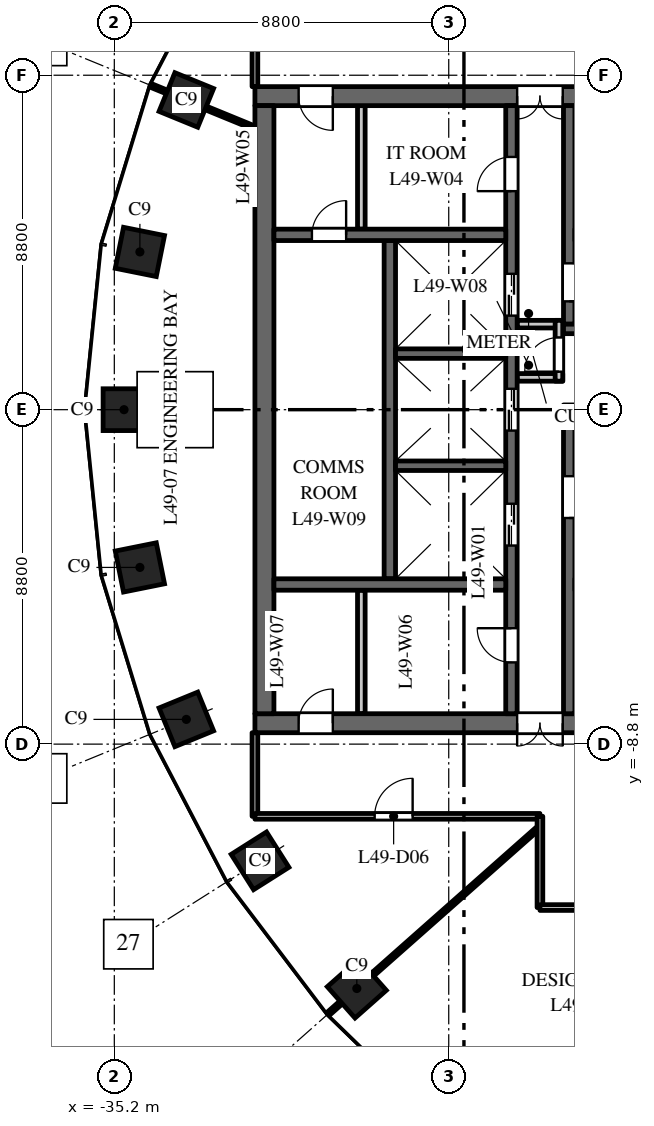
"""IFC4 building model, lengths in metres.
Left out: names, types, materials, properties, quantities, classifications, styles, units other than length and angle.
Written with IfcOpenShell. Run it as: python <this file> out.ifc"""

import sys

from ifc_helpers import new_model, si_unit, direction, frame, frame_2d, origin, origin_2d, place, context, subcontext, project, spatial, rectangle, extrude, element, fill, save


model = new_model("IFC4")
c1 = context("Model", 3, precision=1e-05, world=origin(), true_north=direction((0.0, 1.0)))
c2 = subcontext(c1, "Body", "Model", "MODEL_VIEW")
j1 = project(units=[si_unit("LENGTHUNIT", "METRE"), si_unit("PLANEANGLEUNIT", "RADIAN")], contexts=[c1])
p1 = place(None, origin())
s1 = spatial("IfcSite", under=j1, at=p1, CompositionType="ELEMENT")
p2 = place(p1, origin())
s2 = spatial("IfcBuilding", under=s1, at=p2, CompositionType="ELEMENT")
p3 = place(p2, frame((0.0, 0.0, 237.5)))
s3 = spatial("IfcBuildingStorey", under=s2, at=p3, CompositionType="ELEMENT", Elevation=237.5)
for number, where, z_axis, x_axis in (
    (1, (-33.305, 8.149, 0.0), (0.0, 0.0, 1.0), (-0.379, -0.925, 0.0)),
    (2, (-34.527, 4.151, 0.0), (0.0, 0.0, 1.0), (-0.197, -0.98, 0.0)),
    (3, (-34.945, 0.0, 0.0), (0.0, 0.0, 1.0), (0.0, -1.0, 0.0)),
    (4, (-34.527, -4.151, 0.0), (0.0, 0.0, 1.0), (0.197, -0.98, 0.0)),
    (5, (-33.305, -8.149, 0.0), (0.0, 0.0, 1.0), (0.379, -0.925, 0.0)),
    (6, (-31.365, -11.871, 0.0), (0.0, 0.0, 1.0), (0.535, -0.845, 0.0)),
    (7, (-28.819, -15.23, 0.0), (0.0, 0.0, 1.0), (0.663, -0.749, 0.0)),
):
    element("IfcColumn", number, at=place(p3, frame(where, z_axis=z_axis, x_axis=x_axis)), inside=s3, PredefinedType="COLUMN", context=c2, shape_type="SweptSolid", body=[
        extrude(rectangle(XDim=1.1, YDim=1.1, at=origin_2d()), origin(), (0.0, 0.0, 1.0), 4.0),
    ])
p4 = place(p3, frame((-16.5, 8.25, 0.0), z_axis=(0.0, 0.0, 1.0), x_axis=(-1.0, 0.0, 0.0)))
e8 = element("IfcWall", 8, at=p4, inside=s3, PredefinedType="SHEAR", context=c2, shape_type="SweptSolid", body=[
    extrude(rectangle(XDim=15.0, YDim=0.5, at=frame_2d((7.5, 0.0))), origin(), (0.0, 0.0, 1.0), 3.7),
])
p5 = place(p4, frame((6.9, 0.0, 0.0)))
e9 = element("IfcOpeningElement", 9, at=p5, cuts=e8, PredefinedType="OPENING", context=c2, shape_type="SweptSolid", body=[
    extrude(rectangle(XDim=1.2, YDim=2.1, at=frame_2d((0.6, 1.05))), frame((0.0, 0.26, 0.0), z_axis=(0.0, -1.0, 0.0), x_axis=(1.0, 0.0, 0.0)), (0.0, 0.0, 1.0), 0.52),
])
p6 = place(p4, frame((12.95, 0.0, 0.0)))
e10 = element("IfcOpeningElement", 10, at=p6, cuts=e8, PredefinedType="OPENING", context=c2, shape_type="SweptSolid", body=[
    extrude(rectangle(XDim=0.9, YDim=2.1, at=frame_2d((0.45, 1.05))), frame((0.0, 0.26, 0.0), z_axis=(0.0, -1.0, 0.0), x_axis=(1.0, 0.0, 0.0)), (0.0, 0.0, 1.0), 0.52),
])
p7 = place(p3, frame((-16.5, -8.25, 0.0), z_axis=(0.0, 0.0, 1.0), x_axis=(-1.0, 0.0, 0.0)))
e11 = element("IfcWall", 11, at=p7, inside=s3, PredefinedType="SHEAR", context=c2, shape_type="SweptSolid", body=[
    extrude(rectangle(XDim=15.0, YDim=0.5, at=frame_2d((7.5, 0.0))), origin(), (0.0, 0.0, 1.0), 3.7),
])
p8 = place(p7, frame((6.9, 0.0, 0.0)))
e12 = element("IfcOpeningElement", 12, at=p8, cuts=e11, PredefinedType="OPENING", context=c2, shape_type="SweptSolid", body=[
    extrude(rectangle(XDim=1.2, YDim=2.1, at=frame_2d((0.6, 1.05))), frame((0.0, 0.26, 0.0), z_axis=(0.0, -1.0, 0.0), x_axis=(1.0, 0.0, 0.0)), (0.0, 0.0, 1.0), 0.52),
])
p9 = place(p7, frame((12.95, 0.0, 0.0)))
e13 = element("IfcOpeningElement", 13, at=p9, cuts=e11, PredefinedType="OPENING", context=c2, shape_type="SweptSolid", body=[
    extrude(rectangle(XDim=0.9, YDim=2.1, at=frame_2d((0.45, 1.05))), frame((0.0, 0.26, 0.0), z_axis=(0.0, -1.0, 0.0), x_axis=(1.0, 0.0, 0.0)), (0.0, 0.0, 1.0), 0.52),
])
p10 = place(p3, frame((-27.95, -4.45, 0.0), z_axis=(0.0, 0.0, 1.0), x_axis=(0.0, 1.0, 0.0)))
e14 = element("IfcWall", 14, at=p10, inside=s3, PredefinedType="SHEAR", context=c2, shape_type="SweptSolid", body=[
    extrude(rectangle(XDim=8.9, YDim=0.3, at=frame_2d((4.45, 0.0))), origin(), (0.0, 0.0, 1.0), 3.7),
])
p11 = place(p3, frame((-24.75, -8.0, 0.0), z_axis=(0.0, 0.0, 1.0), x_axis=(0.0, 1.0, 0.0)))
e15 = element("IfcWall", 15, at=p11, inside=s3, PredefinedType="SHEAR", context=c2, shape_type="SweptSolid", body=[
    extrude(rectangle(XDim=16.0, YDim=0.3, at=frame_2d((8.0, 0.0))), origin(), (0.0, 0.0, 1.0), 3.7),
])
p12 = place(p11, frame((4.425, 0.0, 0.0)))
e16 = element("IfcOpeningElement", 16, at=p12, cuts=e15, PredefinedType="OPENING", context=c2, shape_type="SweptSolid", body=[
    extrude(rectangle(XDim=1.1, YDim=2.1, at=frame_2d((0.55, 1.05))), frame((0.0, 0.16, 0.0), z_axis=(0.0, -1.0, 0.0), x_axis=(1.0, 0.0, 0.0)), (0.0, 0.0, 1.0), 0.32),
])
p13 = place(p11, frame((7.45, 0.0, 0.0)))
e17 = element("IfcOpeningElement", 17, at=p13, cuts=e15, PredefinedType="OPENING", context=c2, shape_type="SweptSolid", body=[
    extrude(rectangle(XDim=1.1, YDim=2.1, at=frame_2d((0.55, 1.05))), frame((0.0, 0.16, 0.0), z_axis=(0.0, -1.0, 0.0), x_axis=(1.0, 0.0, 0.0)), (0.0, 0.0, 1.0), 0.32),
])
p14 = place(p11, frame((10.475, 0.0, 0.0)))
e18 = element("IfcOpeningElement", 18, at=p14, cuts=e15, PredefinedType="OPENING", context=c2, shape_type="SweptSolid", body=[
    extrude(rectangle(XDim=1.1, YDim=2.1, at=frame_2d((0.55, 1.05))), frame((0.0, 0.16, 0.0), z_axis=(0.0, -1.0, 0.0), x_axis=(1.0, 0.0, 0.0)), (0.0, 0.0, 1.0), 0.32),
])
p15 = place(p11, frame((13.75, 0.0, 0.0)))
e19 = element("IfcOpeningElement", 19, at=p15, cuts=e15, PredefinedType="OPENING", context=c2, shape_type="SweptSolid", body=[
    extrude(rectangle(XDim=0.9, YDim=2.1, at=frame_2d((0.45, 1.05))), frame((0.0, 0.16, 0.0), z_axis=(0.0, -1.0, 0.0), x_axis=(1.0, 0.0, 0.0)), (0.0, 0.0, 1.0), 0.32),
])
p16 = place(p11, frame((1.35, 0.0, 0.0)))
e20 = element("IfcOpeningElement", 20, at=p16, cuts=e15, PredefinedType="OPENING", context=c2, shape_type="SweptSolid", body=[
    extrude(rectangle(XDim=0.9, YDim=2.1, at=frame_2d((0.45, 1.05))), frame((0.0, 0.16, 0.0), z_axis=(0.0, -1.0, 0.0), x_axis=(1.0, 0.0, 0.0)), (0.0, 0.0, 1.0), 0.32),
])
p17 = place(p3, frame((-20.1, 0.0, 0.0), z_axis=(0.0, 0.0, 1.0), x_axis=(-1.0, 0.0, 0.0)))
e21 = element("IfcWall", 21, at=p17, inside=s3, PredefinedType="SHEAR", context=c2, shape_type="SweptSolid", body=[
    extrude(rectangle(XDim=3.28, YDim=0.25, at=frame_2d((1.64, 0.0))), origin(), (0.0, 0.0, 1.0), 3.7),
])
for number, where, z_axis, x_axis in (
    (22, (-23.4, 0.85, 0.0), (0.0, 0.0, 1.0), (-1.0, 0.0, 0.0)),
    (23, (-23.4, 2.25, 0.0), (0.0, 0.0, 1.0), (-1.0, 0.0, 0.0)),
):
    element("IfcWall", number, at=place(p3, frame(where, z_axis=z_axis, x_axis=x_axis)), inside=s3, PredefinedType="PARTITIONING", context=c2, shape_type="SweptSolid", body=[
        extrude(rectangle(XDim=1.2, YDim=0.2, at=frame_2d((0.6, 0.0))), origin(), (0.0, 0.0, 1.0), 3.7),
    ])
p18 = place(p3, frame((-23.5, 0.75, 0.0), z_axis=(0.0, 0.0, 1.0), x_axis=(0.0, 1.0, 0.0)))
e24 = element("IfcWall", 24, at=p18, inside=s3, PredefinedType="PARTITIONING", context=c2, shape_type="SweptSolid", body=[
    extrude(rectangle(XDim=1.6, YDim=0.2, at=frame_2d((0.8, 0.0))), origin(), (0.0, 0.0, 1.0), 3.7),
])
p19 = place(p18, frame((0.25, 0.0, 0.0)))
e25 = element("IfcOpeningElement", 25, at=p19, cuts=e24, PredefinedType="OPENING", context=c2, shape_type="SweptSolid", body=[
    extrude(rectangle(XDim=0.9, YDim=2.1, at=frame_2d((0.45, 1.05))), frame((0.0, 0.11, 0.0), z_axis=(0.0, -1.0, 0.0), x_axis=(1.0, 0.0, 0.0)), (0.0, 0.0, 1.0), 0.22),
])
p20 = place(p3, frame((-31.25, -8.0, 0.0), z_axis=(0.0, 0.0, 1.0), x_axis=(0.0, 1.0, 0.0)))
e26 = element("IfcWall", 26, at=p20, inside=s3, PredefinedType="SHEAR", context=c2, shape_type="SweptSolid", body=[
    extrude(rectangle(XDim=16.0, YDim=0.5, at=frame_2d((8.0, 0.0))), origin(), (0.0, 0.0, 1.0), 3.7),
])
p21 = place(p3, frame((-24.9, 4.6, 0.0), z_axis=(0.0, 0.0, 1.0), x_axis=(-1.0, 0.0, 0.0)))
e27 = element("IfcWall", 27, at=p21, inside=s3, PredefinedType="SHEAR", context=c2, shape_type="SweptSolid", body=[
    extrude(rectangle(XDim=6.1, YDim=0.3, at=frame_2d((3.05, 0.0))), origin(), (0.0, 0.0, 1.0), 3.7),
])
p22 = place(p21, frame((4.2, 0.0, 0.0)))
e28 = element("IfcOpeningElement", 28, at=p22, cuts=e27, PredefinedType="OPENING", context=c2, shape_type="SweptSolid", body=[
    extrude(rectangle(XDim=0.9, YDim=2.1, at=frame_2d((0.45, 1.05))), frame((0.0, 0.16, 0.0), z_axis=(0.0, -1.0, 0.0), x_axis=(1.0, 0.0, 0.0)), (0.0, 0.0, 1.0), 0.32),
])
for number, where, z_axis, x_axis in (
    (29, (-28.7, 4.75, 0.0), (0.0, 0.0, 1.0), (0.0, 1.0, 0.0)),
    (30, (-28.7, -8.0, 0.0), (0.0, 0.0, 1.0), (0.0, 1.0, 0.0)),
):
    element("IfcWall", number, at=place(p3, frame(where, z_axis=z_axis, x_axis=x_axis)), inside=s3, PredefinedType="PARTITIONING", context=c2, shape_type="SweptSolid", body=[
        extrude(rectangle(XDim=3.25, YDim=0.2, at=frame_2d((1.625, 0.0))), origin(), (0.0, 0.0, 1.0), 3.7),
    ])
p23 = place(p3, frame((-24.9, -4.6, 0.0), z_axis=(0.0, 0.0, 1.0), x_axis=(-1.0, 0.0, 0.0)))
e31 = element("IfcWall", 31, at=p23, inside=s3, PredefinedType="SHEAR", context=c2, shape_type="SweptSolid", body=[
    extrude(rectangle(XDim=6.1, YDim=0.3, at=frame_2d((3.05, 0.0))), origin(), (0.0, 0.0, 1.0), 3.7),
])
for number, where, z_axis, x_axis in (
    (32, (-24.9, -1.475, 0.0), (0.0, 0.0, 1.0), (-1.0, 0.0, 0.0)),
    (33, (-24.9, 1.475, 0.0), (0.0, 0.0, 1.0), (-1.0, 0.0, 0.0)),
):
    element("IfcWall", number, at=place(p3, frame(where, z_axis=z_axis, x_axis=x_axis)), inside=s3, PredefinedType="SHEAR", context=c2, shape_type="SweptSolid", body=[
        extrude(rectangle(XDim=2.9, YDim=0.25, at=frame_2d((1.45, 0.0))), origin(), (0.0, 0.0, 1.0), 3.7),
    ])
p24 = place(p3, frame((-23.23, 2.25, 0.0), z_axis=(0.0, 0.0, 1.0), x_axis=(0.0, 1.0, 0.0)))
e34 = element("IfcWall", 34, at=p24, inside=s3, PredefinedType="SHEAR", context=c2, shape_type="SweptSolid", body=[
    extrude(rectangle(XDim=5.75, YDim=0.3, at=frame_2d((2.875, 0.0))), origin(), (0.0, 0.0, 1.0), 3.7),
])
p25 = place(p24, frame((0.6, 0.0, 0.0)))
e35 = element("IfcOpeningElement", 35, at=p25, cuts=e34, PredefinedType="OPENING", context=c2, shape_type="SweptSolid", body=[
    extrude(rectangle(XDim=1.0, YDim=2.1, at=frame_2d((0.5, 1.05))), frame((0.0, 0.16, 0.0), z_axis=(0.0, -1.0, 0.0), x_axis=(1.0, 0.0, 0.0)), (0.0, 0.0, 1.0), 0.32),
])
p26 = place(p3, frame((-23.23, -8.0, 0.0), z_axis=(0.0, 0.0, 1.0), x_axis=(0.0, 1.0, 0.0)))
e36 = element("IfcWall", 36, at=p26, inside=s3, PredefinedType="SHEAR", context=c2, shape_type="SweptSolid", body=[
    extrude(rectangle(XDim=7.875, YDim=0.3, at=frame_2d((3.938, 0.0))), origin(), (0.0, 0.0, 1.0), 3.7),
])
p27 = place(p26, frame((5.15, 0.0, 0.0)))
e37 = element("IfcOpeningElement", 37, at=p27, cuts=e36, PredefinedType="OPENING", context=c2, shape_type="SweptSolid", body=[
    extrude(rectangle(XDim=1.1, YDim=2.1, at=frame_2d((0.55, 1.05))), frame((0.0, 0.16, 0.0), z_axis=(0.0, -1.0, 0.0), x_axis=(1.0, 0.0, 0.0)), (0.0, 0.0, 1.0), 0.32),
])
p28 = place(p3, frame((-16.9, 4.6, 0.0), z_axis=(0.0, 0.0, 1.0), x_axis=(-1.0, 0.0, 0.0)))
e38 = element("IfcWall", 38, at=p28, inside=s3, PredefinedType="SHEAR", context=c2, shape_type="SweptSolid", body=[
    extrude(rectangle(XDim=6.18, YDim=0.3, at=frame_2d((3.09, 0.0))), origin(), (0.0, 0.0, 1.0), 3.7),
])
p29 = place(p28, frame((4.9, 0.0, 0.0)))
e39 = element("IfcOpeningElement", 39, at=p29, cuts=e38, PredefinedType="OPENING", context=c2, shape_type="SweptSolid", body=[
    extrude(rectangle(XDim=1.1, YDim=2.1, at=frame_2d((0.55, 1.05))), frame((0.0, 0.16, 0.0), z_axis=(0.0, -1.0, 0.0), x_axis=(1.0, 0.0, 0.0)), (0.0, 0.0, 1.0), 0.32),
])
p30 = place(p3, frame((-16.9, -4.6, 0.0), z_axis=(0.0, 0.0, 1.0), x_axis=(-1.0, 0.0, 0.0)))
e40 = element("IfcWall", 40, at=p30, inside=s3, PredefinedType="SHEAR", context=c2, shape_type="SweptSolid", body=[
    extrude(rectangle(XDim=6.18, YDim=0.3, at=frame_2d((3.09, 0.0))), origin(), (0.0, 0.0, 1.0), 3.7),
])
p31 = place(p30, frame((4.9, 0.0, 0.0)))
e41 = element("IfcOpeningElement", 41, at=p31, cuts=e40, PredefinedType="OPENING", context=c2, shape_type="SweptSolid", body=[
    extrude(rectangle(XDim=1.1, YDim=2.1, at=frame_2d((0.55, 1.05))), frame((0.0, 0.16, 0.0), z_axis=(0.0, -1.0, 0.0), x_axis=(1.0, 0.0, 0.0)), (0.0, 0.0, 1.0), 0.32),
])
p32 = place(p3, frame((-20.85, 2.125, 0.0), z_axis=(0.0, 0.0, 1.0), x_axis=(-1.0, 0.0, 0.0)))
e42 = element("IfcWall", 42, at=p32, inside=s3, PredefinedType="SHEAR", context=c2, shape_type="SweptSolid", body=[
    extrude(rectangle(XDim=2.53, YDim=0.25, at=frame_2d((1.265, 0.0))), origin(), (0.0, 0.0, 1.0), 3.7),
])
p33 = place(p3, frame((-34.234, 8.53, 0.0), z_axis=(0.0, 0.0, 1.0), x_axis=(0.925344112436, -0.379128307542, 0.0)))
e43 = element("IfcWall", 43, at=p33, inside=s3, PredefinedType="PARTITIONING", context=c2, shape_type="SweptSolid", body=[
    extrude(rectangle(XDim=2.954, YDim=0.1, at=frame_2d((1.477, 0.0))), origin(), (0.0, 0.0, 1.0), 3.0),
])
p34 = place(p3, frame((-31.5, -10.7, 0.0), z_axis=(0.0, 0.0, 1.0), x_axis=(0.0, 1.0, 0.0)))
e44 = element("IfcWall", 44, at=p34, inside=s3, PredefinedType="PARTITIONING", context=c2, shape_type="SweptSolid", body=[
    extrude(rectangle(XDim=2.2, YDim=0.15, at=frame_2d((1.1, 0.0))), origin(), (0.0, 0.0, 1.0), 3.7),
])
p35 = place(p3, frame((-31.5, -10.7, 0.0), z_axis=(0.0, 0.0, 1.0), x_axis=(1.0, 0.0, 0.0)))
e45 = element("IfcWall", 45, at=p35, inside=s3, PredefinedType="PARTITIONING", context=c2, shape_type="SweptSolid", body=[
    extrude(rectangle(XDim=7.5, YDim=0.15, at=frame_2d((3.75, 0.0))), origin(), (0.0, 0.0, 1.0), 3.1),
])
p36 = place(p35, frame((3.15, 0.0, 0.0)))
e46 = element("IfcOpeningElement", 46, at=p36, cuts=e45, PredefinedType="OPENING", context=c2, shape_type="SweptSolid", body=[
    extrude(rectangle(XDim=1.0, YDim=2.1, at=frame_2d((0.5, 1.05))), frame((0.0, 0.085, 0.0), z_axis=(0.0, -1.0, 0.0), x_axis=(1.0, 0.0, 0.0)), (0.0, 0.0, 1.0), 0.17),
])
p37 = place(p3, frame((-31.5, 8.5, 0.0), z_axis=(0.0, 0.0, 1.0), x_axis=(0.0, 1.0, 0.0)))
e47 = element("IfcWall", 47, at=p37, inside=s3, PredefinedType="PARTITIONING", context=c2, shape_type="SweptSolid", body=[
    extrude(rectangle(XDim=2.2, YDim=0.15, at=frame_2d((1.1, 0.0))), origin(), (0.0, 0.0, 1.0), 3.7),
])
p38 = place(p3, frame((-29.569, -15.895, 0.0), z_axis=(0.0, 0.0, 1.0), x_axis=(0.748936848479, 0.662641378869, 0.0)))
e48 = element("IfcWall", 48, at=p38, inside=s3, PredefinedType="PARTITIONING", context=c2, shape_type="SweptSolid", body=[
    extrude(rectangle(XDim=7.336, YDim=0.1, at=frame_2d((3.668, 0.0))), origin(), (0.0, 0.0, 1.0), 3.0),
])
p39 = place(p3, frame((-24.0, -13.1, 0.0), z_axis=(0.0, 0.0, 1.0), x_axis=(0.0, 1.0, 0.0)))
e49 = element("IfcWall", 49, at=p39, inside=s3, PredefinedType="PARTITIONING", context=c2, shape_type="SweptSolid", body=[
    extrude(rectangle(XDim=2.4, YDim=0.15, at=frame_2d((1.2, 0.0))), origin(), (0.0, 0.0, 1.0), 3.7),
])
p40 = place(p3, frame((-24.0, -13.1, 0.0), z_axis=(0.0, 0.0, 1.0), x_axis=(1.0, 0.0, 0.0)))
e50 = element("IfcWall", 50, at=p40, inside=s3, PredefinedType="PARTITIONING", context=c2, shape_type="SweptSolid", body=[
    extrude(rectangle(XDim=13.357, YDim=0.15, at=frame_2d((6.678, 0.0))), origin(), (0.0, 0.0, 1.0), 2.75),
])
p41 = place(p40, frame((2.65, 0.0, 0.0)))
e51 = element("IfcOpeningElement", 51, at=p41, cuts=e50, PredefinedType="OPENING", context=c2, shape_type="SweptSolid", body=[
    extrude(rectangle(XDim=1.0, YDim=2.1, at=frame_2d((0.5, 1.05))), frame((0.0, 0.085, 0.0), z_axis=(0.0, -1.0, 0.0), x_axis=(1.0, 0.0, 0.0)), (0.0, 0.0, 1.0), 0.17),
])
p42 = place(p40, frame((9.436, 0.0, 0.0)))
e52 = element("IfcOpeningElement", 52, at=p42, cuts=e50, PredefinedType="OPENING", context=c2, shape_type="SweptSolid", body=[
    extrude(rectangle(XDim=1.0, YDim=2.1, at=frame_2d((0.5, 1.05))), frame((0.0, 0.085, 0.0), z_axis=(0.0, -1.0, 0.0), x_axis=(1.0, 0.0, 0.0)), (0.0, 0.0, 1.0), 0.17),
])
p43 = place(p12, origin())
e53 = element("IfcDoor", 53, at=p43, inside=s3, OperationType="DOUBLE_DOOR_SLIDING", PredefinedType="DOOR", context=c2, shape_type="SweptSolid", body=[
    extrude(rectangle(XDim=1.1, YDim=2.1, at=frame_2d((0.55, 1.05))), frame((0.0, 0.025, 0.0), z_axis=(0.0, -1.0, 0.0), x_axis=(1.0, 0.0, 0.0)), (0.0, 0.0, 1.0), 0.05),
])
fill(e16, e53)
p44 = place(p13, origin())
e54 = element("IfcDoor", 54, at=p44, inside=s3, OperationType="DOUBLE_DOOR_SLIDING", PredefinedType="DOOR", context=c2, shape_type="SweptSolid", body=[
    extrude(rectangle(XDim=1.1, YDim=2.1, at=frame_2d((0.55, 1.05))), frame((0.0, 0.025, 0.0), z_axis=(0.0, -1.0, 0.0), x_axis=(1.0, 0.0, 0.0)), (0.0, 0.0, 1.0), 0.05),
])
fill(e17, e54)
p45 = place(p14, origin())
e55 = element("IfcDoor", 55, at=p45, inside=s3, OperationType="DOUBLE_DOOR_SLIDING", PredefinedType="DOOR", context=c2, shape_type="SweptSolid", body=[
    extrude(rectangle(XDim=1.1, YDim=2.1, at=frame_2d((0.55, 1.05))), frame((0.0, 0.025, 0.0), z_axis=(0.0, -1.0, 0.0), x_axis=(1.0, 0.0, 0.0)), (0.0, 0.0, 1.0), 0.05),
])
fill(e18, e55)
p46 = place(p27, origin())
e56 = element("IfcDoor", 56, at=p46, inside=s3, OperationType="SINGLE_SWING_LEFT", PredefinedType="DOOR", context=c2, shape_type="SweptSolid", body=[
    extrude(rectangle(XDim=1.1, YDim=2.1, at=frame_2d((0.55, 1.05))), frame((0.0, 0.025, 0.0), z_axis=(0.0, -1.0, 0.0), x_axis=(1.0, 0.0, 0.0)), (0.0, 0.0, 1.0), 0.05),
])
fill(e37, e56)
p47 = place(p25, origin())
e57 = element("IfcDoor", 57, at=p47, inside=s3, OperationType="SINGLE_SWING_LEFT", PredefinedType="DOOR", context=c2, shape_type="SweptSolid", body=[
    extrude(rectangle(XDim=1.0, YDim=2.1, at=frame_2d((0.5, 1.05))), frame((0.0, 0.025, 0.0), z_axis=(0.0, -1.0, 0.0), x_axis=(1.0, 0.0, 0.0)), (0.0, 0.0, 1.0), 0.05),
])
fill(e35, e57)
p48 = place(p5, origin())
e58 = element("IfcDoor", 58, at=p48, inside=s3, OperationType="DOUBLE_DOOR_DOUBLE_SWING", PredefinedType="DOOR", context=c2, shape_type="SweptSolid", body=[
    extrude(rectangle(XDim=1.2, YDim=2.1, at=frame_2d((0.6, 1.05))), frame((0.0, 0.025, 0.0), z_axis=(0.0, -1.0, 0.0), x_axis=(1.0, 0.0, 0.0)), (0.0, 0.0, 1.0), 0.05),
])
fill(e9, e58)
p49 = place(p8, origin())
e59 = element("IfcDoor", 59, at=p49, inside=s3, OperationType="DOUBLE_DOOR_DOUBLE_SWING", PredefinedType="DOOR", context=c2, shape_type="SweptSolid", body=[
    extrude(rectangle(XDim=1.2, YDim=2.1, at=frame_2d((0.6, 1.05))), frame((0.0, 0.025, 0.0), z_axis=(0.0, -1.0, 0.0), x_axis=(1.0, 0.0, 0.0)), (0.0, 0.0, 1.0), 0.05),
])
fill(e12, e59)
p50 = place(p15, origin())
e60 = element("IfcDoor", 60, at=p50, inside=s3, OperationType="SINGLE_SWING_RIGHT", PredefinedType="DOOR", context=c2, shape_type="SweptSolid", body=[
    extrude(rectangle(XDim=0.9, YDim=2.1, at=frame_2d((0.45, 1.05))), frame((0.0, 0.025, 0.0), z_axis=(0.0, -1.0, 0.0), x_axis=(1.0, 0.0, 0.0)), (0.0, 0.0, 1.0), 0.05),
])
fill(e19, e60)
p51 = place(p6, origin())
e61 = element("IfcDoor", 61, at=p51, inside=s3, OperationType="SINGLE_SWING_RIGHT", PredefinedType="DOOR", context=c2, shape_type="SweptSolid", body=[
    extrude(rectangle(XDim=0.9, YDim=2.1, at=frame_2d((0.45, 1.05))), frame((0.0, 0.025, 0.0), z_axis=(0.0, -1.0, 0.0), x_axis=(1.0, 0.0, 0.0)), (0.0, 0.0, 1.0), 0.05),
])
fill(e10, e61)
p52 = place(p16, origin())
e62 = element("IfcDoor", 62, at=p52, inside=s3, OperationType="SINGLE_SWING_LEFT", PredefinedType="DOOR", context=c2, shape_type="SweptSolid", body=[
    extrude(rectangle(XDim=0.9, YDim=2.1, at=frame_2d((0.45, 1.05))), frame((0.0, 0.025, 0.0), z_axis=(0.0, -1.0, 0.0), x_axis=(1.0, 0.0, 0.0)), (0.0, 0.0, 1.0), 0.05),
])
fill(e20, e62)
p53 = place(p9, origin())
e63 = element("IfcDoor", 63, at=p53, inside=s3, OperationType="SINGLE_SWING_LEFT", PredefinedType="DOOR", context=c2, shape_type="SweptSolid", body=[
    extrude(rectangle(XDim=0.9, YDim=2.1, at=frame_2d((0.45, 1.05))), frame((0.0, 0.025, 0.0), z_axis=(0.0, -1.0, 0.0), x_axis=(1.0, 0.0, 0.0)), (0.0, 0.0, 1.0), 0.05),
])
fill(e13, e63)
p54 = place(p19, origin())
e64 = element("IfcDoor", 64, at=p54, inside=s3, OperationType="SINGLE_SWING_RIGHT", PredefinedType="DOOR", context=c2, shape_type="SweptSolid", body=[
    extrude(rectangle(XDim=0.9, YDim=2.1, at=frame_2d((0.45, 1.05))), frame((0.0, 0.025, 0.0), z_axis=(0.0, -1.0, 0.0), x_axis=(1.0, 0.0, 0.0)), (0.0, 0.0, 1.0), 0.05),
])
fill(e25, e64)
p55 = place(p22, origin())
e65 = element("IfcDoor", 65, at=p55, inside=s3, OperationType="SINGLE_SWING_LEFT", PredefinedType="DOOR", context=c2, shape_type="SweptSolid", body=[
    extrude(rectangle(XDim=0.9, YDim=2.1, at=frame_2d((0.45, 1.05))), frame((0.0, 0.025, 0.0), z_axis=(0.0, -1.0, 0.0), x_axis=(1.0, 0.0, 0.0)), (0.0, 0.0, 1.0), 0.05),
])
fill(e28, e65)
p56 = place(p36, origin())
e66 = element("IfcDoor", 66, at=p56, inside=s3, OperationType="SINGLE_SWING_RIGHT", PredefinedType="DOOR", context=c2, shape_type="SweptSolid", body=[
    extrude(rectangle(XDim=1.0, YDim=2.1, at=frame_2d((0.5, 1.05))), frame((0.0, 0.025, 0.0), z_axis=(0.0, -1.0, 0.0), x_axis=(1.0, 0.0, 0.0)), (0.0, 0.0, 1.0), 0.05),
])
fill(e46, e66)
save(model, sys.argv[1])
